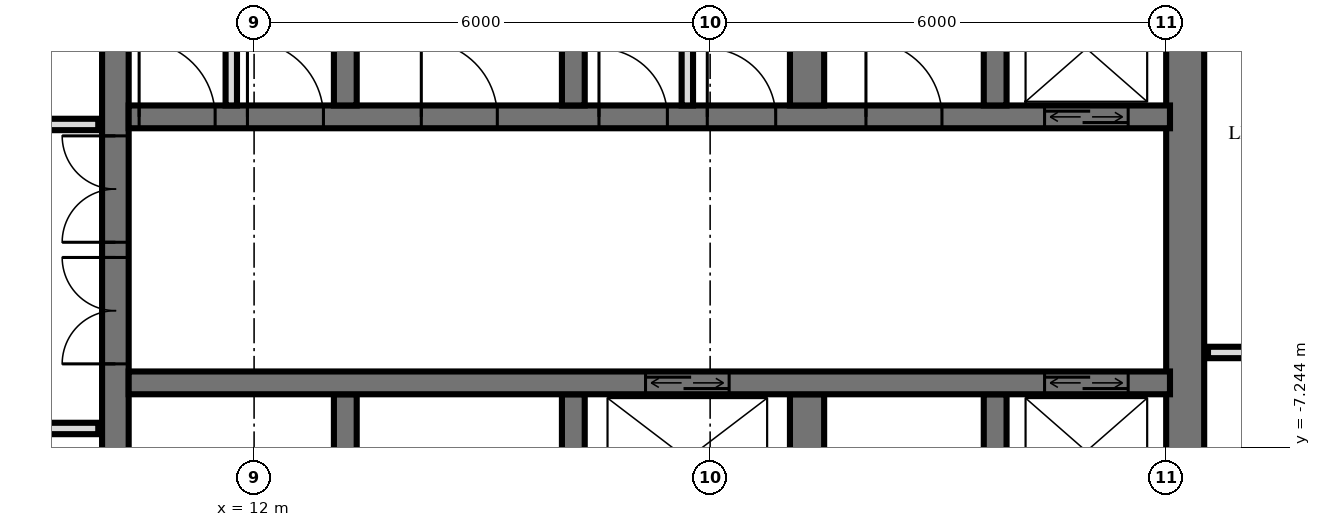
"""IFC4 building model, lengths in metres.
Left out: names, types, materials, properties, quantities, classifications, styles, units other than length and angle.
Written with IfcOpenShell. Run it as: python <this file> out.ifc"""

import sys

from ifc_helpers import new_model, si_unit, direction, frame, frame_2d, origin, place, context, subcontext, project, spatial, rectangle, extrude, element, fill, save


model = new_model("IFC4")
c1 = context("Model", 3, precision=1e-05, world=origin(), true_north=direction((0.0, 1.0)))
c2 = subcontext(c1, "Body", "Model", "MODEL_VIEW")
j1 = project(units=[si_unit("LENGTHUNIT", "METRE"), si_unit("PLANEANGLEUNIT", "RADIAN")], contexts=[c1])
p1 = place(None, origin())
s1 = spatial("IfcSite", under=j1, at=p1, CompositionType="ELEMENT")
p2 = place(p1, origin())
s2 = spatial("IfcBuilding", under=s1, at=p2, CompositionType="ELEMENT")
p3 = place(p2, frame((0.0, 0.0, 204.6)))
s3 = spatial("IfcBuildingStorey", under=s2, at=p3, CompositionType="ELEMENT", Elevation=204.6)
p4 = place(p3, frame((10.175, -14.55, 0.0), z_axis=(0.0, 0.0, 1.0), x_axis=(0.0, 1.0, 0.0)))
e1 = element("IfcWall", 1, at=p4, inside=s3, PredefinedType="SHEAR", context=c2, shape_type="SweptSolid", body=[
    extrude(rectangle(XDim=14.1, YDim=0.35, at=frame_2d((7.05, 0.0))), origin(), (0.0, 0.0, 1.0), 3.5),
])
p5 = place(p4, frame((8.4, 0.0, 0.0)))
e2 = element("IfcOpeningElement", 2, at=p5, cuts=e1, PredefinedType="OPENING", context=c2, shape_type="SweptSolid", body=[
    extrude(rectangle(XDim=1.4, YDim=2.4, at=frame_2d((0.7, 1.2))), frame((0.0, 0.185, 0.0), z_axis=(0.0, -1.0, 0.0), x_axis=(1.0, 0.0, 0.0)), (0.0, 0.0, 1.0), 0.37),
])
p6 = place(p4, frame((10.0, 0.0, 0.0)))
e3 = element("IfcOpeningElement", 3, at=p6, cuts=e1, PredefinedType="OPENING", context=c2, shape_type="SweptSolid", body=[
    extrude(rectangle(XDim=1.4, YDim=2.4, at=frame_2d((0.7, 1.2))), frame((0.0, 0.185, 0.0), z_axis=(0.0, -1.0, 0.0), x_axis=(1.0, 0.0, 0.0)), (0.0, 0.0, 1.0), 0.37),
])
p7 = place(p4, frame((4.0, 0.0, 0.0)))
e4 = element("IfcOpeningElement", 4, at=p7, cuts=e1, PredefinedType="OPENING", context=c2, shape_type="SweptSolid", body=[
    extrude(rectangle(XDim=1.2, YDim=2.1, at=frame_2d((0.6, 1.05))), frame((0.0, 0.185, 0.0), z_axis=(0.0, -1.0, 0.0), x_axis=(1.0, 0.0, 0.0)), (0.0, 0.0, 1.0), 0.37),
])
p8 = place(p3, frame((24.25, -14.55, 0.0), z_axis=(0.0, 0.0, 1.0), x_axis=(0.0, 1.0, 0.0)))
e5 = element("IfcWall", 5, at=p8, inside=s3, PredefinedType="SHEAR", context=c2, shape_type="SweptSolid", body=[
    extrude(rectangle(XDim=14.1, YDim=0.5, at=frame_2d((7.05, 0.0))), origin(), (0.0, 0.0, 1.0), 3.5),
])
p9 = place(p3, frame((10.35, -2.9, 0.0), z_axis=(0.0, 0.0, 1.0), x_axis=(1.0, 0.0, 0.0)))
e6 = element("IfcWall", 6, at=p9, inside=s3, PredefinedType="SHEAR", context=c2, shape_type="SweptSolid", body=[
    extrude(rectangle(XDim=13.7, YDim=0.3, at=frame_2d((6.85, 0.0))), origin(), (0.0, 0.0, 1.0), 3.5),
])
p10 = place(p9, frame((12.05, 0.0, 0.0)))
e7 = element("IfcOpeningElement", 7, at=p10, cuts=e6, PredefinedType="OPENING", context=c2, shape_type="SweptSolid", body=[
    extrude(rectangle(XDim=1.1, YDim=2.1, at=frame_2d((0.55, 1.05))), frame((0.0, 0.16, 0.0), z_axis=(0.0, -1.0, 0.0), x_axis=(1.0, 0.0, 0.0)), (0.0, 0.0, 1.0), 0.32),
])
p11 = place(p9, frame((6.188, 0.0, 0.0)))
e8 = element("IfcOpeningElement", 8, at=p11, cuts=e6, PredefinedType="OPENING", context=c2, shape_type="SweptSolid", body=[
    extrude(rectangle(XDim=0.9, YDim=2.1, at=frame_2d((0.45, 1.05))), frame((0.0, 0.16, 0.0), z_axis=(0.0, -1.0, 0.0), x_axis=(1.0, 0.0, 0.0)), (0.0, 0.0, 1.0), 0.32),
])
p12 = place(p9, frame((7.613, 0.0, 0.0)))
e9 = element("IfcOpeningElement", 9, at=p12, cuts=e6, PredefinedType="OPENING", context=c2, shape_type="SweptSolid", body=[
    extrude(rectangle(XDim=0.9, YDim=2.1, at=frame_2d((0.45, 1.05))), frame((0.0, 0.16, 0.0), z_axis=(0.0, -1.0, 0.0), x_axis=(1.0, 0.0, 0.0)), (0.0, 0.0, 1.0), 0.32),
])
p13 = place(p9, frame((0.137, 0.0, 0.0)))
e10 = element("IfcOpeningElement", 10, at=p13, cuts=e6, PredefinedType="OPENING", context=c2, shape_type="SweptSolid", body=[
    extrude(rectangle(XDim=1.0, YDim=2.1, at=frame_2d((0.5, 1.05))), frame((0.0, 0.16, 0.0), z_axis=(0.0, -1.0, 0.0), x_axis=(1.0, 0.0, 0.0)), (0.0, 0.0, 1.0), 0.32),
])
p14 = place(p9, frame((1.562, 0.0, 0.0)))
e11 = element("IfcOpeningElement", 11, at=p14, cuts=e6, PredefinedType="OPENING", context=c2, shape_type="SweptSolid", body=[
    extrude(rectangle(XDim=1.0, YDim=2.1, at=frame_2d((0.5, 1.05))), frame((0.0, 0.16, 0.0), z_axis=(0.0, -1.0, 0.0), x_axis=(1.0, 0.0, 0.0)), (0.0, 0.0, 1.0), 0.32),
])
p15 = place(p9, frame((3.85, 0.0, 0.0)))
e12 = element("IfcOpeningElement", 12, at=p15, cuts=e6, PredefinedType="OPENING", context=c2, shape_type="SweptSolid", body=[
    extrude(rectangle(XDim=1.0, YDim=2.1, at=frame_2d((0.5, 1.05))), frame((0.0, 0.16, 0.0), z_axis=(0.0, -1.0, 0.0), x_axis=(1.0, 0.0, 0.0)), (0.0, 0.0, 1.0), 0.32),
])
p16 = place(p9, frame((9.7, 0.0, 0.0)))
e13 = element("IfcOpeningElement", 13, at=p16, cuts=e6, PredefinedType="OPENING", context=c2, shape_type="SweptSolid", body=[
    extrude(rectangle(XDim=1.0, YDim=2.1, at=frame_2d((0.5, 1.05))), frame((0.0, 0.16, 0.0), z_axis=(0.0, -1.0, 0.0), x_axis=(1.0, 0.0, 0.0)), (0.0, 0.0, 1.0), 0.32),
])
p17 = place(p3, frame((10.35, -6.4, 0.0), z_axis=(0.0, 0.0, 1.0), x_axis=(1.0, 0.0, 0.0)))
e14 = element("IfcWall", 14, at=p17, inside=s3, PredefinedType="SHEAR", context=c2, shape_type="SweptSolid", body=[
    extrude(rectangle(XDim=13.7, YDim=0.3, at=frame_2d((6.85, 0.0))), origin(), (0.0, 0.0, 1.0), 3.5),
])
p18 = place(p17, frame((12.05, 0.0, 0.0)))
e15 = element("IfcOpeningElement", 15, at=p18, cuts=e14, PredefinedType="OPENING", context=c2, shape_type="SweptSolid", body=[
    extrude(rectangle(XDim=1.1, YDim=2.1, at=frame_2d((0.55, 1.05))), frame((0.0, 0.16, 0.0), z_axis=(0.0, -1.0, 0.0), x_axis=(1.0, 0.0, 0.0)), (0.0, 0.0, 1.0), 0.32),
])
p19 = place(p17, frame((6.8, 0.0, 0.0)))
e16 = element("IfcOpeningElement", 16, at=p19, cuts=e14, PredefinedType="OPENING", context=c2, shape_type="SweptSolid", body=[
    extrude(rectangle(XDim=1.1, YDim=2.1, at=frame_2d((0.55, 1.05))), frame((0.0, 0.16, 0.0), z_axis=(0.0, -1.0, 0.0), x_axis=(1.0, 0.0, 0.0)), (0.0, 0.0, 1.0), 0.32),
])
for number, where, z_axis, x_axis in (
    (17, (13.2, -2.75, 0.0), (0.0, 0.0, 1.0), (0.0, 1.0, 0.0)),
    (18, (13.2, -8.85, 0.0), (0.0, 0.0, 1.0), (0.0, 1.0, 0.0)),
    (19, (16.2, -2.75, 0.0), (0.0, 0.0, 1.0), (0.0, 1.0, 0.0)),
    (20, (16.2, -8.85, 0.0), (0.0, 0.0, 1.0), (0.0, 1.0, 0.0)),
):
    element("IfcWall", number, at=place(p3, frame(where, z_axis=z_axis, x_axis=x_axis)), inside=s3, PredefinedType="SHEAR", context=c2, shape_type="SweptSolid", body=[
        extrude(rectangle(XDim=2.3, YDim=0.3, at=frame_2d((1.15, 0.0))), origin(), (0.0, 0.0, 1.0), 3.5),
    ])
for number, where, z_axis, x_axis in (
    (21, (19.275, -2.75, 0.0), (0.0, 0.0, 1.0), (0.0, 1.0, 0.0)),
    (22, (19.275, -8.85, 0.0), (0.0, 0.0, 1.0), (0.0, 1.0, 0.0)),
):
    element("IfcWall", number, at=place(p3, frame(where, z_axis=z_axis, x_axis=x_axis)), inside=s3, PredefinedType="SHEAR", context=c2, shape_type="SweptSolid", body=[
        extrude(rectangle(XDim=2.3, YDim=0.45, at=frame_2d((1.15, 0.0))), origin(), (0.0, 0.0, 1.0), 3.5),
    ])
for number, where, z_axis, x_axis in (
    (23, (21.75, -2.75, 0.0), (0.0, 0.0, 1.0), (0.0, 1.0, 0.0)),
    (24, (21.75, -8.85, 0.0), (0.0, 0.0, 1.0), (0.0, 1.0, 0.0)),
):
    element("IfcWall", number, at=place(p3, frame(where, z_axis=z_axis, x_axis=x_axis)), inside=s3, PredefinedType="SHEAR", context=c2, shape_type="SweptSolid", body=[
        extrude(rectangle(XDim=2.3, YDim=0.3, at=frame_2d((1.15, 0.0))), origin(), (0.0, 0.0, 1.0), 3.5),
    ])
for number, where, z_axis, x_axis in (
    (25, (17.7, -2.75, 0.0), (0.0, 0.0, 1.0), (0.0, 1.0, 0.0)),
    (26, (11.7, -2.75, 0.0), (0.0, 0.0, 1.0), (0.0, 1.0, 0.0)),
):
    element("IfcWall", number, at=place(p3, frame(where, z_axis=z_axis, x_axis=x_axis)), inside=s3, PredefinedType="PARTITIONING", context=c2, shape_type="SweptSolid", body=[
        extrude(rectangle(XDim=2.3, YDim=0.15, at=frame_2d((1.15, 0.0))), origin(), (0.0, 0.0, 1.0), 3.2),
    ])
p20 = place(p3, frame((-9.95, -7.0, 0.0), z_axis=(0.0, 0.0, 1.0), x_axis=(1.0, 0.0, 0.0)))
e27 = element("IfcWall", 27, at=p20, inside=s3, PredefinedType="PARTITIONING", context=c2, shape_type="SweptSolid", body=[
    extrude(rectangle(XDim=19.9, YDim=0.15, at=frame_2d((9.95, 0.0))), origin(), (0.0, 0.0, 1.0), 3.22),
])
p21 = place(p20, frame((9.45, 0.0, 0.0)))
e28 = element("IfcOpeningElement", 28, at=p21, cuts=e27, PredefinedType="OPENING", context=c2, shape_type="SweptSolid", body=[
    extrude(rectangle(XDim=1.0, YDim=2.1, at=frame_2d((0.5, 1.05))), frame((0.0, 0.085, 0.0), z_axis=(0.0, -1.0, 0.0), x_axis=(1.0, 0.0, 0.0)), (0.0, 0.0, 1.0), 0.17),
])
p22 = place(p20, frame((3.45, 0.0, 0.0)))
e29 = element("IfcOpeningElement", 29, at=p22, cuts=e27, PredefinedType="OPENING", context=c2, shape_type="SweptSolid", body=[
    extrude(rectangle(XDim=1.0, YDim=2.1, at=frame_2d((0.5, 1.05))), frame((0.0, 0.085, 0.0), z_axis=(0.0, -1.0, 0.0), x_axis=(1.0, 0.0, 0.0)), (0.0, 0.0, 1.0), 0.17),
])
p23 = place(p3, frame((24.55, -6.0, 0.0), z_axis=(0.0, 0.0, 1.0), x_axis=(1.0, 0.0, 0.0)))
e30 = element("IfcWall", 30, at=p23, inside=s3, PredefinedType="PARTITIONING", context=c2, shape_type="SweptSolid", body=[
    extrude(rectangle(XDim=2.27, YDim=0.15, at=frame_2d((1.135, 0.0))), origin(), (0.0, 0.0, 1.0), 3.22),
])
p24 = place(p23, frame((0.75, 0.0, 0.0)))
e31 = element("IfcOpeningElement", 31, at=p24, cuts=e30, PredefinedType="OPENING", context=c2, shape_type="SweptSolid", body=[
    extrude(rectangle(XDim=0.9, YDim=2.1, at=frame_2d((0.45, 1.05))), frame((0.0, 0.085, 0.0), z_axis=(0.0, -1.0, 0.0), x_axis=(1.0, 0.0, 0.0)), (0.0, 0.0, 1.0), 0.17),
])
p25 = place(p3, frame((-9.95, -3.0, 0.0), z_axis=(0.0, 0.0, 1.0), x_axis=(1.0, 0.0, 0.0)))
e32 = element("IfcWall", 32, at=p25, inside=s3, PredefinedType="PARTITIONING", context=c2, shape_type="SweptSolid", body=[
    extrude(rectangle(XDim=19.9, YDim=0.15, at=frame_2d((9.95, 0.0))), origin(), (0.0, 0.0, 1.0), 3.22),
])
p26 = place(p25, frame((4.2, 0.0, 0.0)))
e33 = element("IfcOpeningElement", 33, at=p26, cuts=e32, PredefinedType="OPENING", context=c2, shape_type="SweptSolid", body=[
    extrude(rectangle(XDim=1.0, YDim=2.1, at=frame_2d((0.5, 1.05))), frame((0.0, 0.085, 0.0), z_axis=(0.0, -1.0, 0.0), x_axis=(1.0, 0.0, 0.0)), (0.0, 0.0, 1.0), 0.17),
])
p27 = place(p25, frame((11.45, 0.0, 0.0)))
e34 = element("IfcOpeningElement", 34, at=p27, cuts=e32, PredefinedType="OPENING", context=c2, shape_type="SweptSolid", body=[
    extrude(rectangle(XDim=1.0, YDim=2.1, at=frame_2d((0.5, 1.05))), frame((0.0, 0.085, 0.0), z_axis=(0.0, -1.0, 0.0), x_axis=(1.0, 0.0, 0.0)), (0.0, 0.0, 1.0), 0.17),
])
p28 = place(p25, frame((15.45, 0.0, 0.0)))
e35 = element("IfcOpeningElement", 35, at=p28, cuts=e32, PredefinedType="OPENING", context=c2, shape_type="SweptSolid", body=[
    extrude(rectangle(XDim=1.0, YDim=2.1, at=frame_2d((0.5, 1.05))), frame((0.0, 0.085, 0.0), z_axis=(0.0, -1.0, 0.0), x_axis=(1.0, 0.0, 0.0)), (0.0, 0.0, 1.0), 0.17),
])
p29 = place(p25, frame((18.2, 0.0, 0.0)))
e36 = element("IfcOpeningElement", 36, at=p29, cuts=e32, PredefinedType="OPENING", context=c2, shape_type="SweptSolid", body=[
    extrude(rectangle(XDim=1.0, YDim=2.1, at=frame_2d((0.5, 1.05))), frame((0.0, 0.085, 0.0), z_axis=(0.0, -1.0, 0.0), x_axis=(1.0, 0.0, 0.0)), (0.0, 0.0, 1.0), 0.17),
])
p30 = place(p10, origin())
e37 = element("IfcDoor", 37, at=p30, inside=s3, OperationType="DOUBLE_DOOR_SLIDING", PredefinedType="USERDEFINED", context=c2, shape_type="SweptSolid", body=[
    extrude(rectangle(XDim=1.1, YDim=2.1, at=frame_2d((0.55, 1.05))), frame((0.0, 0.025, 0.0), z_axis=(0.0, -1.0, 0.0), x_axis=(1.0, 0.0, 0.0)), (0.0, 0.0, 1.0), 0.05),
])
fill(e7, e37)
p31 = place(p18, origin())
e38 = element("IfcDoor", 38, at=p31, inside=s3, OperationType="DOUBLE_DOOR_SLIDING", PredefinedType="USERDEFINED", context=c2, shape_type="SweptSolid", body=[
    extrude(rectangle(XDim=1.1, YDim=2.1, at=frame_2d((0.55, 1.05))), frame((0.0, 0.025, 0.0), z_axis=(0.0, -1.0, 0.0), x_axis=(1.0, 0.0, 0.0)), (0.0, 0.0, 1.0), 0.05),
])
fill(e15, e38)
p32 = place(p19, origin())
e39 = element("IfcDoor", 39, at=p32, inside=s3, OperationType="DOUBLE_DOOR_SLIDING", PredefinedType="USERDEFINED", context=c2, shape_type="SweptSolid", body=[
    extrude(rectangle(XDim=1.1, YDim=2.1, at=frame_2d((0.55, 1.05))), frame((0.0, 0.025, 0.0), z_axis=(0.0, -1.0, 0.0), x_axis=(1.0, 0.0, 0.0)), (0.0, 0.0, 1.0), 0.05),
])
fill(e16, e39)
p33 = place(p5, origin())
e40 = element("IfcDoor", 40, at=p33, inside=s3, OperationType="DOUBLE_DOOR_SINGLE_SWING", PredefinedType="DOOR", context=c2, shape_type="SweptSolid", body=[
    extrude(rectangle(XDim=1.4, YDim=2.4, at=frame_2d((0.7, 1.2))), frame((0.0, 0.025, 0.0), z_axis=(0.0, -1.0, 0.0), x_axis=(1.0, 0.0, 0.0)), (0.0, 0.0, 1.0), 0.05),
])
fill(e2, e40)
p34 = place(p6, origin())
e41 = element("IfcDoor", 41, at=p34, inside=s3, OperationType="DOUBLE_DOOR_SINGLE_SWING", PredefinedType="DOOR", context=c2, shape_type="SweptSolid", body=[
    extrude(rectangle(XDim=1.4, YDim=2.4, at=frame_2d((0.7, 1.2))), frame((0.0, 0.025, 0.0), z_axis=(0.0, -1.0, 0.0), x_axis=(1.0, 0.0, 0.0)), (0.0, 0.0, 1.0), 0.05),
])
fill(e3, e41)
p35 = place(p11, origin())
e42 = element("IfcDoor", 42, at=p35, inside=s3, OperationType="SINGLE_SWING_RIGHT", PredefinedType="DOOR", context=c2, shape_type="SweptSolid", body=[
    extrude(rectangle(XDim=0.9, YDim=2.1, at=frame_2d((0.45, 1.05))), frame((0.0, 0.025, 0.0), z_axis=(0.0, -1.0, 0.0), x_axis=(1.0, 0.0, 0.0)), (0.0, 0.0, 1.0), 0.05),
])
fill(e8, e42)
p36 = place(p12, origin())
e43 = element("IfcDoor", 43, at=p36, inside=s3, OperationType="SINGLE_SWING_RIGHT", PredefinedType="DOOR", context=c2, shape_type="SweptSolid", body=[
    extrude(rectangle(XDim=0.9, YDim=2.1, at=frame_2d((0.45, 1.05))), frame((0.0, 0.025, 0.0), z_axis=(0.0, -1.0, 0.0), x_axis=(1.0, 0.0, 0.0)), (0.0, 0.0, 1.0), 0.05),
])
fill(e9, e43)
p37 = place(p13, origin())
e44 = element("IfcDoor", 44, at=p37, inside=s3, OperationType="SINGLE_SWING_RIGHT", PredefinedType="DOOR", context=c2, shape_type="SweptSolid", body=[
    extrude(rectangle(XDim=1.0, YDim=2.1, at=frame_2d((0.5, 1.05))), frame((0.0, 0.025, 0.0), z_axis=(0.0, -1.0, 0.0), x_axis=(1.0, 0.0, 0.0)), (0.0, 0.0, 1.0), 0.05),
])
fill(e10, e44)
p38 = place(p14, origin())
e45 = element("IfcDoor", 45, at=p38, inside=s3, OperationType="SINGLE_SWING_RIGHT", PredefinedType="DOOR", context=c2, shape_type="SweptSolid", body=[
    extrude(rectangle(XDim=1.0, YDim=2.1, at=frame_2d((0.5, 1.05))), frame((0.0, 0.025, 0.0), z_axis=(0.0, -1.0, 0.0), x_axis=(1.0, 0.0, 0.0)), (0.0, 0.0, 1.0), 0.05),
])
fill(e11, e45)
p39 = place(p15, origin())
e46 = element("IfcDoor", 46, at=p39, inside=s3, OperationType="SINGLE_SWING_RIGHT", PredefinedType="DOOR", context=c2, shape_type="SweptSolid", body=[
    extrude(rectangle(XDim=1.0, YDim=2.1, at=frame_2d((0.5, 1.05))), frame((0.0, 0.025, 0.0), z_axis=(0.0, -1.0, 0.0), x_axis=(1.0, 0.0, 0.0)), (0.0, 0.0, 1.0), 0.05),
])
fill(e12, e46)
p40 = place(p16, origin())
e47 = element("IfcDoor", 47, at=p40, inside=s3, OperationType="SINGLE_SWING_RIGHT", PredefinedType="DOOR", context=c2, shape_type="SweptSolid", body=[
    extrude(rectangle(XDim=1.0, YDim=2.1, at=frame_2d((0.5, 1.05))), frame((0.0, 0.025, 0.0), z_axis=(0.0, -1.0, 0.0), x_axis=(1.0, 0.0, 0.0)), (0.0, 0.0, 1.0), 0.05),
])
fill(e13, e47)
save(model, sys.argv[1])
